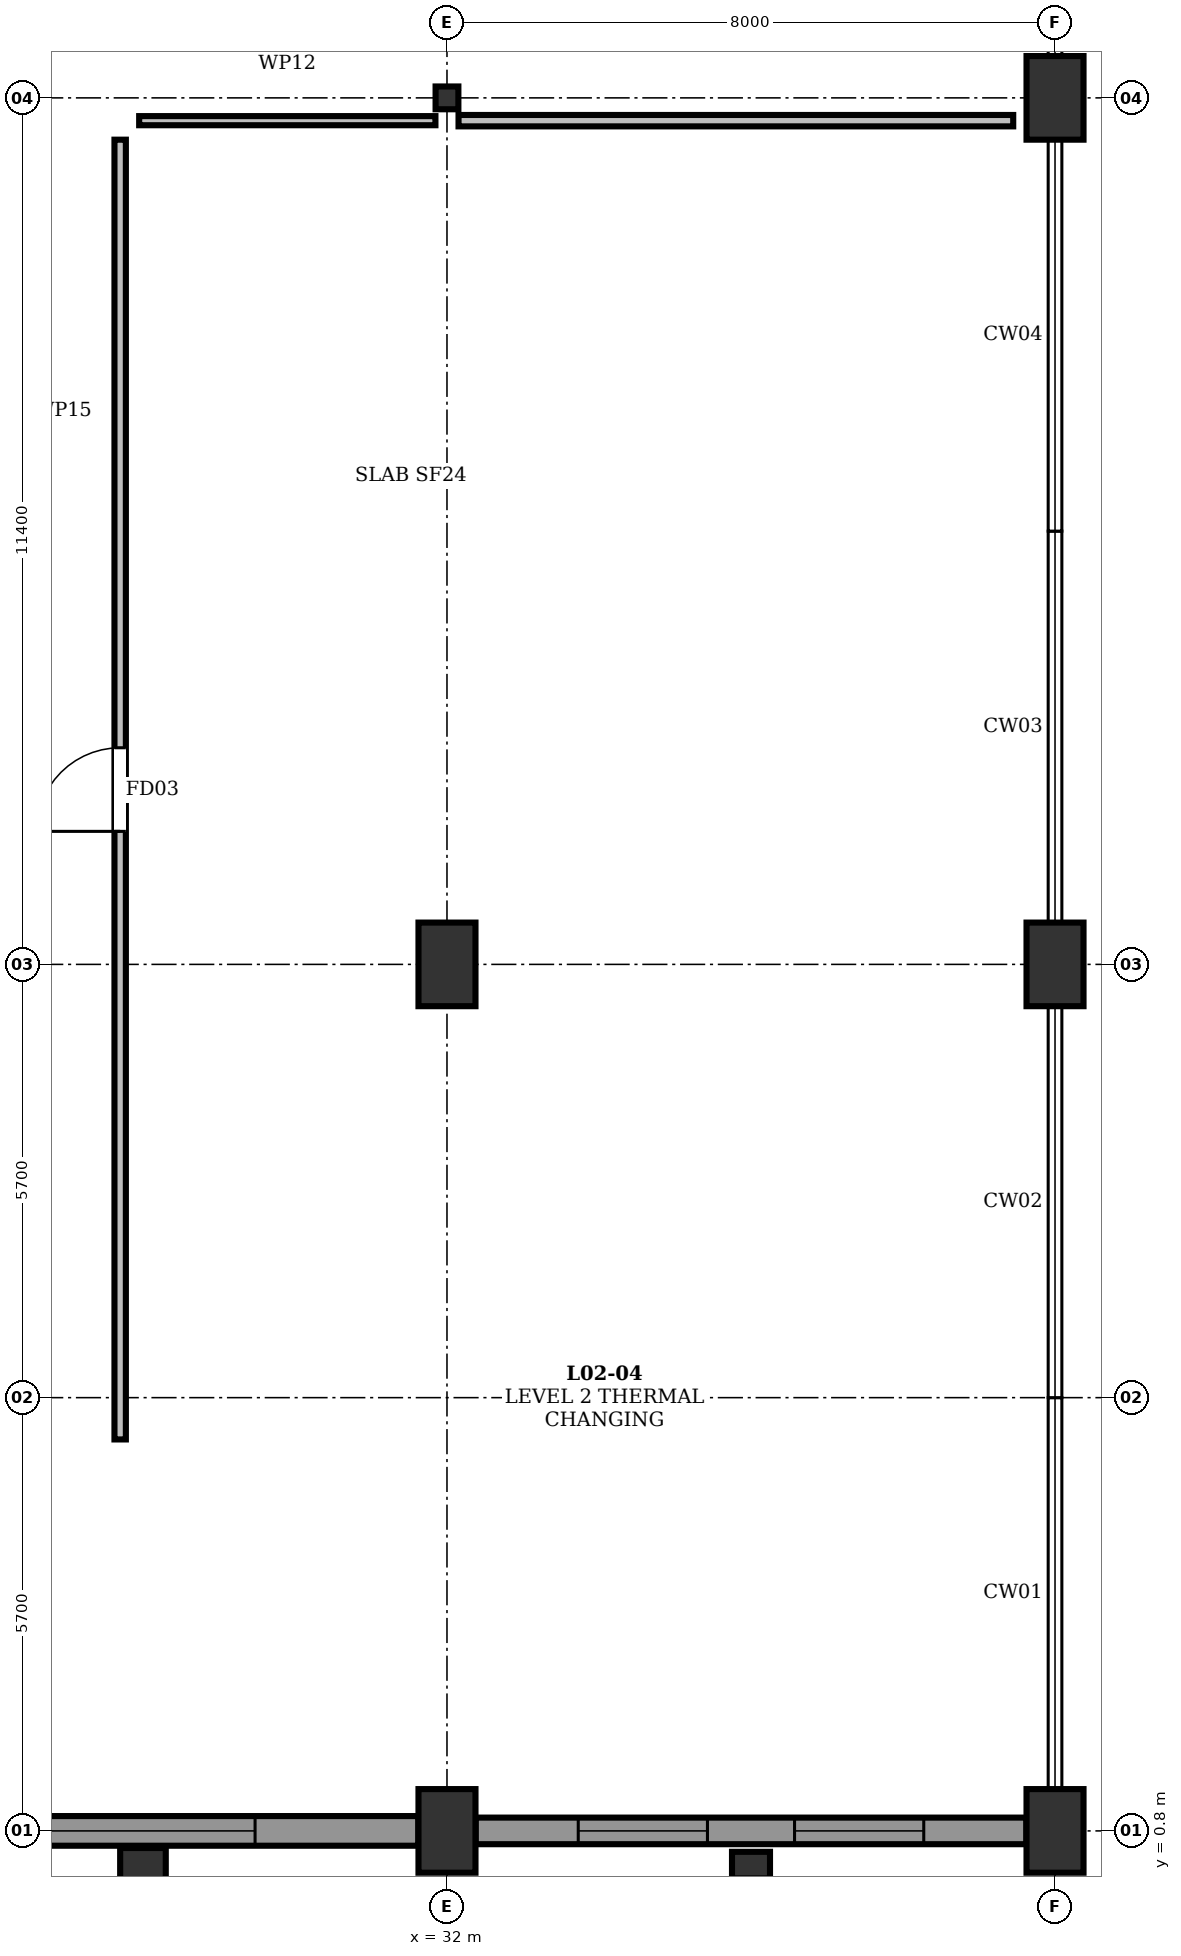
"""IFC4 building model, lengths in metres.
Left out: names, types, materials, properties, quantities, classifications, styles, units other than length and angle.
Written with IfcOpenShell. Run it as: python <this file> out.ifc"""

import sys

from ifc_helpers import new_model, si_unit, direction, frame, frame_2d, origin, origin_2d, place, context, subcontext, project, spatial, rectangle, hollow_rectangle, extrude, element, fill, save


model = new_model("IFC4")
c1 = context("Model", 3, precision=1e-05, world=origin(), true_north=direction((0.0, 1.0)))
c2 = subcontext(c1, "Body", "Model", "MODEL_VIEW")
j1 = project(units=[si_unit("LENGTHUNIT", "METRE"), si_unit("PLANEANGLEUNIT", "RADIAN")], contexts=[c1])
p1 = place(None, origin())
s1 = spatial("IfcSite", under=j1, at=p1, CompositionType="ELEMENT")
p2 = place(p1, origin())
s2 = spatial("IfcBuilding", under=s1, at=p2, CompositionType="ELEMENT")
p3 = place(p2, frame((0.0, 0.0, 10.2)))
s3 = spatial("IfcBuildingStorey", under=s2, at=p3, CompositionType="ELEMENT", Elevation=10.2)
for number, where, z_axis, x_axis in (
    (1, (32.0, 0.8, 0.0), (0.0, 0.0, 1.0), (1.0, 0.0, 0.0)),
    (2, (32.0, 12.2, 0.0), (0.0, 0.0, 1.0), (1.0, 0.0, 0.0)),
):
    element("IfcColumn", number, at=place(p3, frame(where, z_axis=z_axis, x_axis=x_axis)), inside=s3, PredefinedType="COLUMN", context=c2, shape_type="SweptSolid", body=[
        extrude(rectangle(XDim=0.75, YDim=1.1, at=origin_2d()), origin(), (0.0, 0.0, 1.0), 4.5),
    ])
p4 = place(p3, frame((32.0, 23.6, 0.0), z_axis=(0.0, 0.0, 1.0), x_axis=(1.0, 0.0, 0.0)))
e3 = element("IfcColumn", 3, at=p4, inside=s3, PredefinedType="COLUMN", context=c2, shape_type="SweptSolid", body=[
    extrude(hollow_rectangle(XDim=0.3, YDim=0.3, WallThickness=0.012, at=origin_2d()), origin(), (0.0, 0.0, 1.0), 4.5),
])
for number, where, z_axis, x_axis in (
    (4, (40.0, 0.8, 0.0), (0.0, 0.0, 1.0), (1.0, 0.0, 0.0)),
    (5, (40.0, 12.2, 0.0), (0.0, 0.0, 1.0), (1.0, 0.0, 0.0)),
    (6, (40.0, 23.6, 0.0), (0.0, 0.0, 1.0), (1.0, 0.0, 0.0)),
):
    element("IfcColumn", number, at=place(p3, frame(where, z_axis=z_axis, x_axis=x_axis)), inside=s3, PredefinedType="COLUMN", context=c2, shape_type="SweptSolid", body=[
        extrude(rectangle(XDim=0.75, YDim=1.1, at=origin_2d()), origin(), (0.0, 0.0, 1.0), 4.5),
    ])
p5 = place(p3, frame((28.0, 0.35, 0.0), z_axis=(0.0, 0.0, 1.0), x_axis=(0.0, 1.0, 0.0)))
e7 = element("IfcColumn", 7, at=p5, inside=s3, PredefinedType="PILASTER", context=c2, shape_type="SweptSolid", body=[
    extrude(rectangle(XDim=0.45, YDim=0.6, at=origin_2d()), origin(), (0.0, 0.0, 1.0), 4.5),
])
p6 = place(p3, frame((36.0, 0.35, 0.0), z_axis=(0.0, 0.0, 1.0), x_axis=(0.0, 1.0, 0.0)))
e8 = element("IfcColumn", 8, at=p6, inside=s3, PredefinedType="PILASTER", context=c2, shape_type="SweptSolid", body=[
    extrude(rectangle(XDim=0.35, YDim=0.5, at=origin_2d()), origin(), (0.0, 0.0, 1.0), 4.5),
])
p7 = place(p3, frame((24.377, 0.8, 0.0), z_axis=(0.0, 0.0, 1.0), x_axis=(1.0, 0.0, 0.0)))
e9 = element("IfcWall", 9, at=p7, inside=s3, PredefinedType="STANDARD", context=c2, shape_type="SweptSolid", body=[
    extrude(rectangle(XDim=7.246, YDim=0.39, at=frame_2d((3.623, 0.0))), origin(), (0.0, 0.0, 1.0), 3.712),
])
p8 = place(p7, frame((2.148, 0.0, 0.75)))
e10 = element("IfcOpeningElement", 10, at=p8, cuts=e9, PredefinedType="OPENING", context=c2, shape_type="SweptSolid", body=[
    extrude(rectangle(XDim=2.95, YDim=2.05, at=frame_2d((1.475, 1.025))), frame((0.0, 0.207, 0.0), z_axis=(0.0, -1.0, 0.0), x_axis=(1.0, 0.0, 0.0)), (0.0, 0.0, 1.0), 0.414),
])
p9 = place(p3, frame((32.377, 0.8, 0.0), z_axis=(0.0, 0.0, 1.0), x_axis=(1.0, 0.0, 0.0)))
e11 = element("IfcWall", 11, at=p9, inside=s3, PredefinedType="STANDARD", context=c2, shape_type="SweptSolid", body=[
    extrude(rectangle(XDim=7.246, YDim=0.35, at=frame_2d((3.623, 0.0))), origin(), (0.0, 0.0, 1.0), 3.712),
])
p10 = place(p9, frame((1.35, 0.0, 0.75)))
e12 = element("IfcOpeningElement", 12, at=p10, cuts=e11, PredefinedType="OPENING", context=c2, shape_type="SweptSolid", body=[
    extrude(rectangle(XDim=1.7, YDim=1.25, at=frame_2d((0.85, 0.625))), frame((0.0, 0.187, 0.0), z_axis=(0.0, -1.0, 0.0), x_axis=(1.0, 0.0, 0.0)), (0.0, 0.0, 1.0), 0.374),
])
p11 = place(p9, frame((4.196, 0.0, 0.75)))
e13 = element("IfcOpeningElement", 13, at=p11, cuts=e11, PredefinedType="OPENING", context=c2, shape_type="SweptSolid", body=[
    extrude(rectangle(XDim=1.7, YDim=1.25, at=frame_2d((0.85, 0.625))), frame((0.0, 0.187, 0.0), z_axis=(0.0, -1.0, 0.0), x_axis=(1.0, 0.0, 0.0)), (0.0, 0.0, 1.0), 0.374),
])
p12 = place(p2, frame((0.0, 0.0, 27.0)))
s4 = spatial("IfcBuildingStorey", under=s2, at=p12, CompositionType="ELEMENT", Elevation=27.0)
p13 = place(p12, frame((40.4, 0.65, -16.2), z_axis=(0.0, 0.0, 1.0), x_axis=(1.0, 0.0, 0.0)))
e14 = element("IfcWall", 14, at=p13, inside=s4, PredefinedType="PARAPET", context=c2, shape_type="SweptSolid", body=[
    extrude(rectangle(XDim=15.4, YDim=0.27, at=frame_2d((7.7, 0.0))), origin(), (0.0, 0.0, 1.0), 1.0),
])
p14 = place(p3, frame((27.7, 5.95, 0.0), z_axis=(0.0, 0.0, 1.0), x_axis=(0.0, 1.0, 0.0)))
e15 = element("IfcWall", 15, at=p14, inside=s3, PredefinedType="PARTITIONING", context=c2, shape_type="SweptSolid", body=[
    extrude(rectangle(XDim=17.1, YDim=0.15, at=frame_2d((8.55, 0.0))), origin(), (0.0, 0.0, 1.0), 3.345),
])
p15 = place(p14, frame((8.0, 0.0, 0.0)))
e16 = element("IfcOpeningElement", 16, at=p15, cuts=e15, PredefinedType="OPENING", context=c2, shape_type="SweptSolid", body=[
    extrude(rectangle(XDim=1.1, YDim=2.2, at=frame_2d((0.55, 1.1))), frame((0.0, 0.087, 0.0), z_axis=(0.0, -1.0, 0.0), x_axis=(1.0, 0.0, 0.0)), (0.0, 0.0, 1.0), 0.174),
])
p16 = place(p3, frame((27.95, 23.3, 0.0), z_axis=(0.0, 0.0, 1.0), x_axis=(1.0, 0.0, 0.0)))
e17 = element("IfcWall", 17, at=p16, inside=s3, PredefinedType="PARTITIONING", context=c2, shape_type="SweptSolid", body=[
    extrude(rectangle(XDim=3.898, YDim=0.12, at=frame_2d((1.949, 0.0))), origin(), (0.0, 0.0, 1.0), 3.345),
])
p17 = place(p3, frame((32.152, 23.3, 0.0), z_axis=(0.0, 0.0, 1.0), x_axis=(1.0, 0.0, 0.0)))
e18 = element("IfcWall", 18, at=p17, inside=s3, PredefinedType="PARTITIONING", context=c2, shape_type="SweptSolid", body=[
    extrude(rectangle(XDim=7.298, YDim=0.15, at=frame_2d((3.649, 0.0))), origin(), (0.0, 0.0, 1.0), 3.345),
])
p18 = place(p8, origin())
e19 = element("IfcWindow", 19, at=p18, inside=s3, PartitioningType="TRIPLE_PANEL_VERTICAL", PredefinedType="WINDOW", context=c2, shape_type="SweptSolid", body=[
    extrude(rectangle(XDim=2.95, YDim=2.05, at=frame_2d((1.475, 1.025))), frame((0.0, 0.08, 0.0), z_axis=(0.0, -1.0, 0.0), x_axis=(1.0, 0.0, 0.0)), (0.0, 0.0, 1.0), 0.06),
])
fill(e10, e19)
p19 = place(p10, origin())
e20 = element("IfcWindow", 20, at=p19, inside=s3, PartitioningType="DOUBLE_PANEL_HORIZONTAL", PredefinedType="WINDOW", context=c2, shape_type="SweptSolid", body=[
    extrude(rectangle(XDim=1.7, YDim=1.25, at=frame_2d((0.85, 0.625))), frame((0.0, 0.08, 0.0), z_axis=(0.0, -1.0, 0.0), x_axis=(1.0, 0.0, 0.0)), (0.0, 0.0, 1.0), 0.06),
])
fill(e12, e20)
p20 = place(p11, origin())
e21 = element("IfcWindow", 21, at=p20, inside=s3, PartitioningType="DOUBLE_PANEL_HORIZONTAL", PredefinedType="WINDOW", context=c2, shape_type="SweptSolid", body=[
    extrude(rectangle(XDim=1.7, YDim=1.25, at=frame_2d((0.85, 0.625))), frame((0.0, 0.08, 0.0), z_axis=(0.0, -1.0, 0.0), x_axis=(1.0, 0.0, 0.0)), (0.0, 0.0, 1.0), 0.06),
])
fill(e13, e21)
p21 = place(p15, origin())
e22 = element("IfcDoor", 22, at=p21, inside=s3, OperationType="SINGLE_SWING_LEFT", PredefinedType="DOOR", context=c2, shape_type="SweptSolid", body=[
    extrude(rectangle(XDim=1.1, YDim=2.2, at=frame_2d((0.55, 1.1))), frame((0.0, 0.025, 0.0), z_axis=(0.0, -1.0, 0.0), x_axis=(1.0, 0.0, 0.0)), (0.0, 0.0, 1.0), 0.05),
])
fill(e16, e22)
save(model, sys.argv[1])
